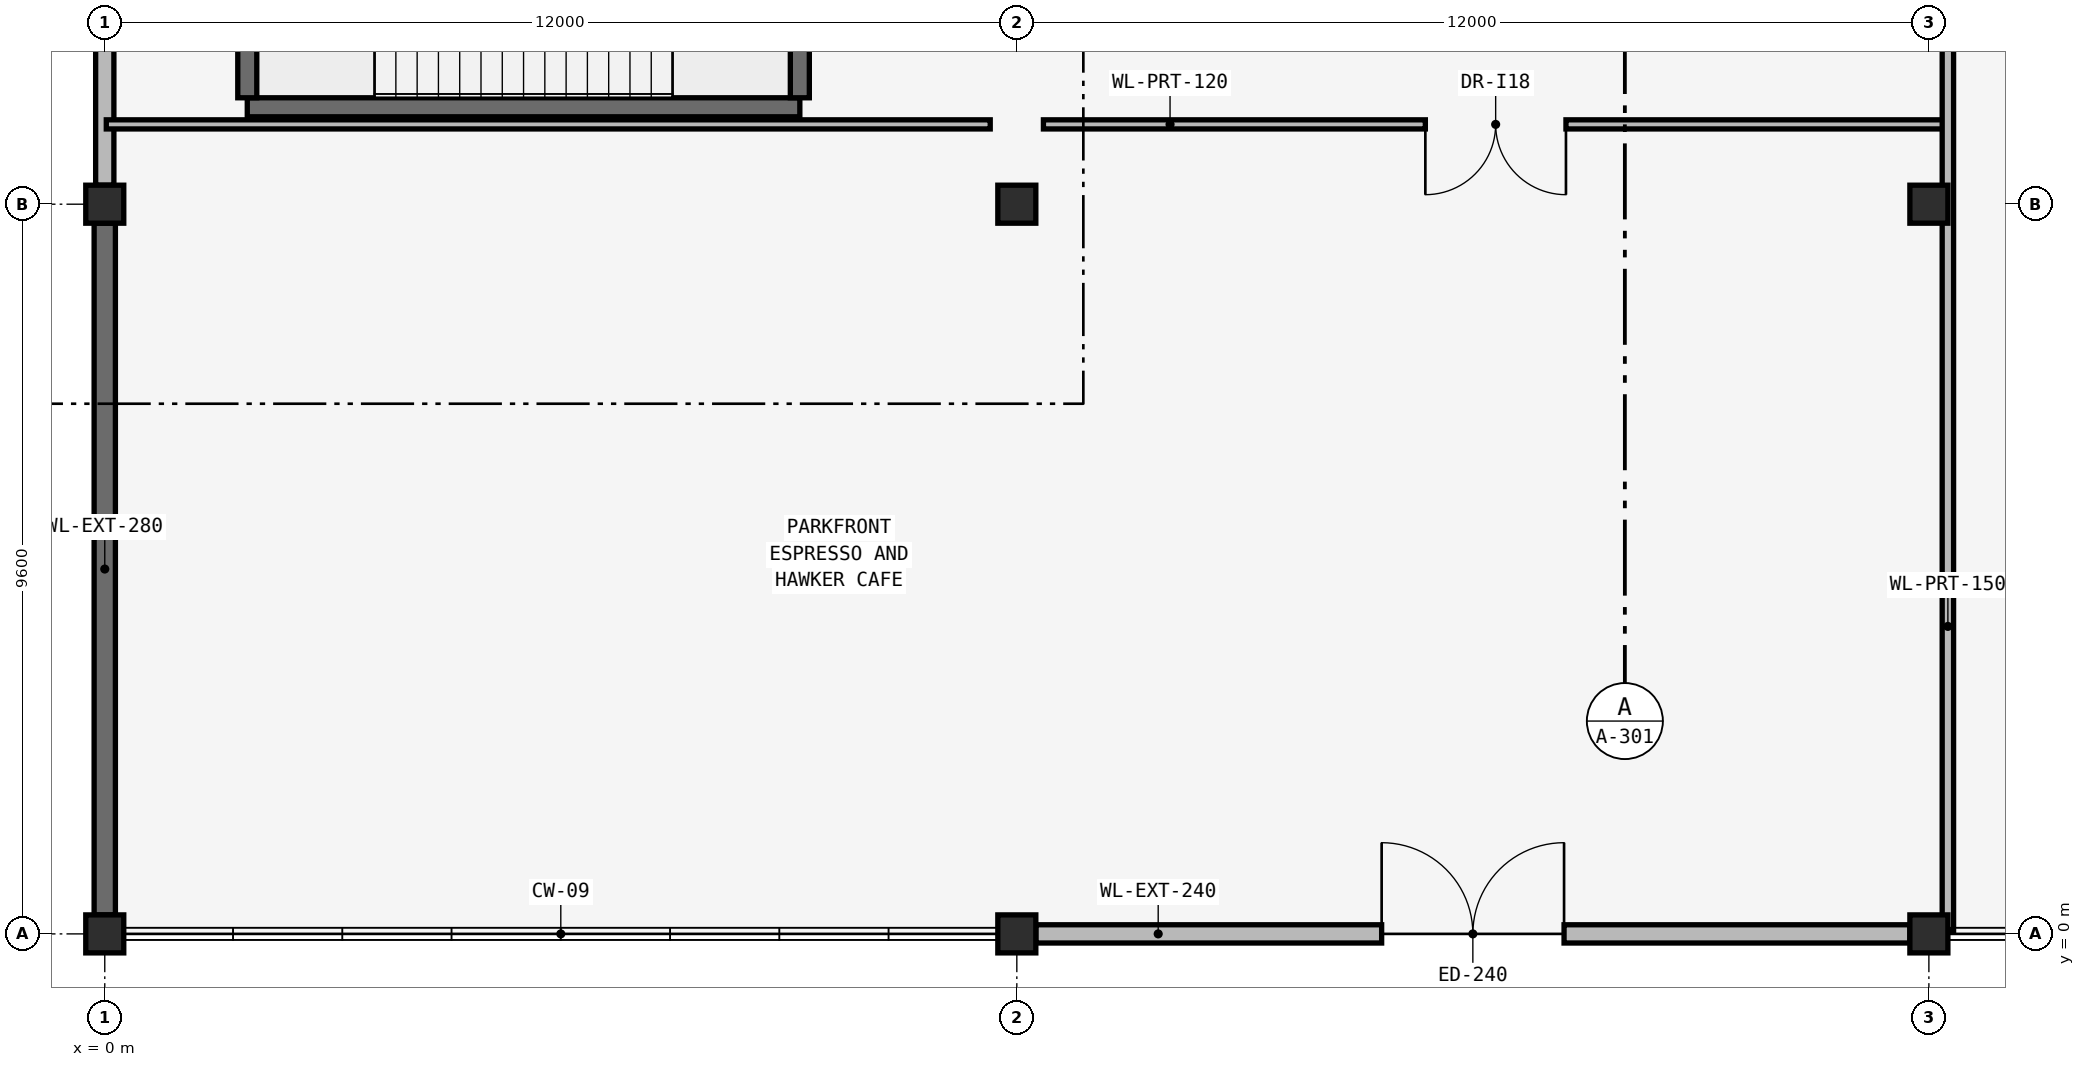
"""IFC4 building model, lengths in metres.
Left out: names, types, materials, properties, quantities, classifications, styles, units other than length and angle.
Written with IfcOpenShell. Run it as: python <this file> out.ifc"""

import sys

from ifc_helpers import new_model, si_unit, direction, frame, frame_2d, origin, origin_2d, place, context, subcontext, project, spatial, rectangle, extrude, element, fill, save


model = new_model("IFC4")
c1 = context("Model", 3, precision=1e-05, world=origin(), true_north=direction((0.0, 1.0)))
c2 = subcontext(c1, "Body", "Model", "MODEL_VIEW")
j1 = project(units=[si_unit("LENGTHUNIT", "METRE"), si_unit("PLANEANGLEUNIT", "RADIAN")], contexts=[c1])
p1 = place(None, origin())
s1 = spatial("IfcSite", under=j1, at=p1, CompositionType="ELEMENT")
p2 = place(p1, origin())
s2 = spatial("IfcBuilding", under=s1, at=p2, CompositionType="ELEMENT")
p3 = place(p2, origin())
s3 = spatial("IfcBuildingStorey", under=s2, at=p3, CompositionType="ELEMENT", Elevation=0.0)
for number, where, z_axis, x_axis in (
    (1, (0.0, 0.0, -0.27), (0.0, 0.0, 1.0), (1.0, 0.0, 0.0)),
    (2, (12.0, 0.0, -0.27), (0.0, 0.0, 1.0), (1.0, 0.0, 0.0)),
    (3, (24.0, 0.0, -0.27), (0.0, 0.0, 1.0), (1.0, 0.0, 0.0)),
    (4, (0.0, 9.6, -0.27), (0.0, 0.0, 1.0), (1.0, 0.0, 0.0)),
    (5, (12.0, 9.6, -0.27), (0.0, 0.0, 1.0), (1.0, 0.0, 0.0)),
    (6, (24.0, 9.6, -0.27), (0.0, 0.0, 1.0), (1.0, 0.0, 0.0)),
):
    element("IfcColumn", number, at=place(p3, frame(where, z_axis=z_axis, x_axis=x_axis)), inside=s3, PredefinedType="COLUMN", context=c2, shape_type="SweptSolid", body=[
        extrude(rectangle(XDim=0.5, YDim=0.5, at=origin_2d()), origin(), (0.0, 0.0, 1.0), 5.67),
    ])
p4 = place(p3, frame((12.25, 0.0, 0.0), z_axis=(0.0, 0.0, 1.0), x_axis=(1.0, 0.0, 0.0)))
e7 = element("IfcWall", 7, at=p4, inside=s3, PredefinedType="SOLIDWALL", context=c2, shape_type="SweptSolid", body=[
    extrude(rectangle(XDim=11.5, YDim=0.24, at=frame_2d((5.75, 0.0))), origin(), (0.0, 0.0, 1.0), 4.456),
])
p5 = place(p4, frame((4.55, 0.0, 0.0)))
e8 = element("IfcOpeningElement", 8, at=p5, cuts=e7, PredefinedType="OPENING", context=c2, shape_type="SweptSolid", body=[
    extrude(rectangle(XDim=2.4, YDim=2.4, at=frame_2d((1.2, 1.2))), frame((0.0, 0.135, 0.0), z_axis=(0.0, -1.0, 0.0), x_axis=(1.0, 0.0, 0.0)), (0.0, 0.0, 1.0), 0.27),
])
p6 = place(p3, frame((0.0, 0.25, 0.0), z_axis=(0.0, 0.0, 1.0), x_axis=(0.0, 1.0, 0.0)))
e9 = element("IfcWall", 9, at=p6, inside=s3, PredefinedType="SOLIDWALL", context=c2, shape_type="SweptSolid", body=[
    extrude(rectangle(XDim=9.1, YDim=0.28, at=frame_2d((4.55, 0.0))), origin(), (0.0, 0.0, 1.0), 5.1),
])
p7 = place(p3, frame((0.0, 9.85, 0.0), z_axis=(0.0, 0.0, 1.0), x_axis=(0.0, 1.0, 0.0)))
e10 = element("IfcWall", 10, at=p7, inside=s3, PredefinedType="SOLIDWALL", context=c2, shape_type="SweptSolid", body=[
    extrude(rectangle(XDim=9.1, YDim=0.24, at=frame_2d((4.55, 0.0))), origin(), (0.0, 0.0, 1.0), 4.456),
])
p8 = place(p7, frame((3.95, 0.0, 0.0)))
e11 = element("IfcOpeningElement", 11, at=p8, cuts=e10, PredefinedType="OPENING", context=c2, shape_type="SweptSolid", body=[
    extrude(rectangle(XDim=1.2, YDim=2.2, at=frame_2d((0.6, 1.1))), frame((0.0, 0.135, 0.0), z_axis=(0.0, -1.0, 0.0), x_axis=(1.0, 0.0, 0.0)), (0.0, 0.0, 1.0), 0.27),
])
p9 = place(p3, frame((1.875, 10.875, 0.0), z_axis=(0.0, 0.0, 1.0), x_axis=(1.0, 0.0, 0.0)))
e12 = element("IfcWall", 12, at=p9, inside=s3, PredefinedType="SHEAR", context=c2, shape_type="SweptSolid", body=[
    extrude(rectangle(XDim=7.27, YDim=0.25, at=frame_2d((3.635, 0.0))), origin(), (0.0, 0.0, 1.0), 5.08),
])
for number, where, z_axis, x_axis in (
    (13, (1.875, 11.0, 0.0), (0.0, 0.0, 1.0), (0.0, 1.0, 0.0)),
    (14, (9.145, 11.0, 0.0), (0.0, 0.0, 1.0), (0.0, 1.0, 0.0)),
):
    element("IfcWall", number, at=place(p3, frame(where, z_axis=z_axis, x_axis=x_axis)), inside=s3, PredefinedType="SHEAR", context=c2, shape_type="SweptSolid", body=[
        extrude(rectangle(XDim=3.3, YDim=0.25, at=frame_2d((1.65, 0.0))), origin(), (0.0, 0.0, 1.0), 5.08),
    ])
p10 = place(p3, frame((0.02, 10.65, 0.0), z_axis=(0.0, 0.0, 1.0), x_axis=(1.0, 0.0, 0.0)))
e15 = element("IfcWall", 15, at=p10, inside=s3, PredefinedType="PARTITIONING", context=c2, shape_type="SweptSolid", body=[
    extrude(rectangle(XDim=11.63, YDim=0.12, at=frame_2d((5.815, 0.0))), origin(), (0.0, 0.0, 1.0), 5.08),
])
p11 = place(p3, frame((12.35, 10.65, 0.0), z_axis=(0.0, 0.0, 1.0), x_axis=(1.0, 0.0, 0.0)))
e16 = element("IfcWall", 16, at=p11, inside=s3, PredefinedType="PARTITIONING", context=c2, shape_type="SweptSolid", body=[
    extrude(rectangle(XDim=11.9, YDim=0.12, at=frame_2d((5.95, 0.0))), origin(), (0.0, 0.0, 1.0), 5.08),
])
p12 = place(p11, frame((5.025, 0.0, 0.0)))
e17 = element("IfcOpeningElement", 17, at=p12, cuts=e16, PredefinedType="OPENING", context=c2, shape_type="SweptSolid", body=[
    extrude(rectangle(XDim=1.85, YDim=2.2, at=frame_2d((0.925, 1.1))), frame((0.0, 0.075, 0.0), z_axis=(0.0, -1.0, 0.0), x_axis=(1.0, 0.0, 0.0)), (0.0, 0.0, 1.0), 0.15),
])
p13 = place(p3, frame((24.25, 0.04, 0.0), z_axis=(0.0, 0.0, 1.0), x_axis=(0.0, 1.0, 0.0)))
e18 = element("IfcWall", 18, at=p13, inside=s3, PredefinedType="PARTITIONING", context=c2, shape_type="SweptSolid", body=[
    extrude(rectangle(XDim=28.61, YDim=0.15, at=frame_2d((14.305, 0.0))), origin(), (0.0, 0.0, 1.0), 5.08),
])
p14 = place(p13, frame((13.645, 0.0, 0.0)))
e19 = element("IfcOpeningElement", 19, at=p14, cuts=e18, PredefinedType="OPENING", context=c2, shape_type="SweptSolid", body=[
    extrude(rectangle(XDim=1.32, YDim=2.15, at=frame_2d((0.66, 1.075))), frame((0.0, 0.09, 0.0), z_axis=(0.0, -1.0, 0.0), x_axis=(1.0, 0.0, 0.0)), (0.0, 0.0, 1.0), 0.18),
])
p15 = place(p5, frame((2.4, 0.0, 0.0), z_axis=(0.0, 0.0, 1.0), x_axis=(-1.0, 0.0, 0.0)))
e20 = element("IfcDoor", 20, at=p15, inside=s3, OperationType="DOUBLE_DOOR_SINGLE_SWING", PredefinedType="DOOR", context=c2, shape_type="SweptSolid", body=[
    extrude(rectangle(XDim=2.4, YDim=2.4, at=frame_2d((1.2, 1.2))), frame((0.0, 0.025, 0.0), z_axis=(0.0, -1.0, 0.0), x_axis=(1.0, 0.0, 0.0)), (0.0, 0.0, 1.0), 0.05),
])
fill(e8, e20)
p16 = place(p12, origin())
e21 = element("IfcDoor", 21, at=p16, inside=s3, OperationType="DOUBLE_DOOR_SINGLE_SWING", PredefinedType="DOOR", context=c2, shape_type="SweptSolid", body=[
    extrude(rectangle(XDim=1.85, YDim=2.2, at=frame_2d((0.925, 1.1))), frame((0.0, 0.025, 0.0), z_axis=(0.0, -1.0, 0.0), x_axis=(1.0, 0.0, 0.0)), (0.0, 0.0, 1.0), 0.05),
])
fill(e17, e21)
save(model, sys.argv[1])
